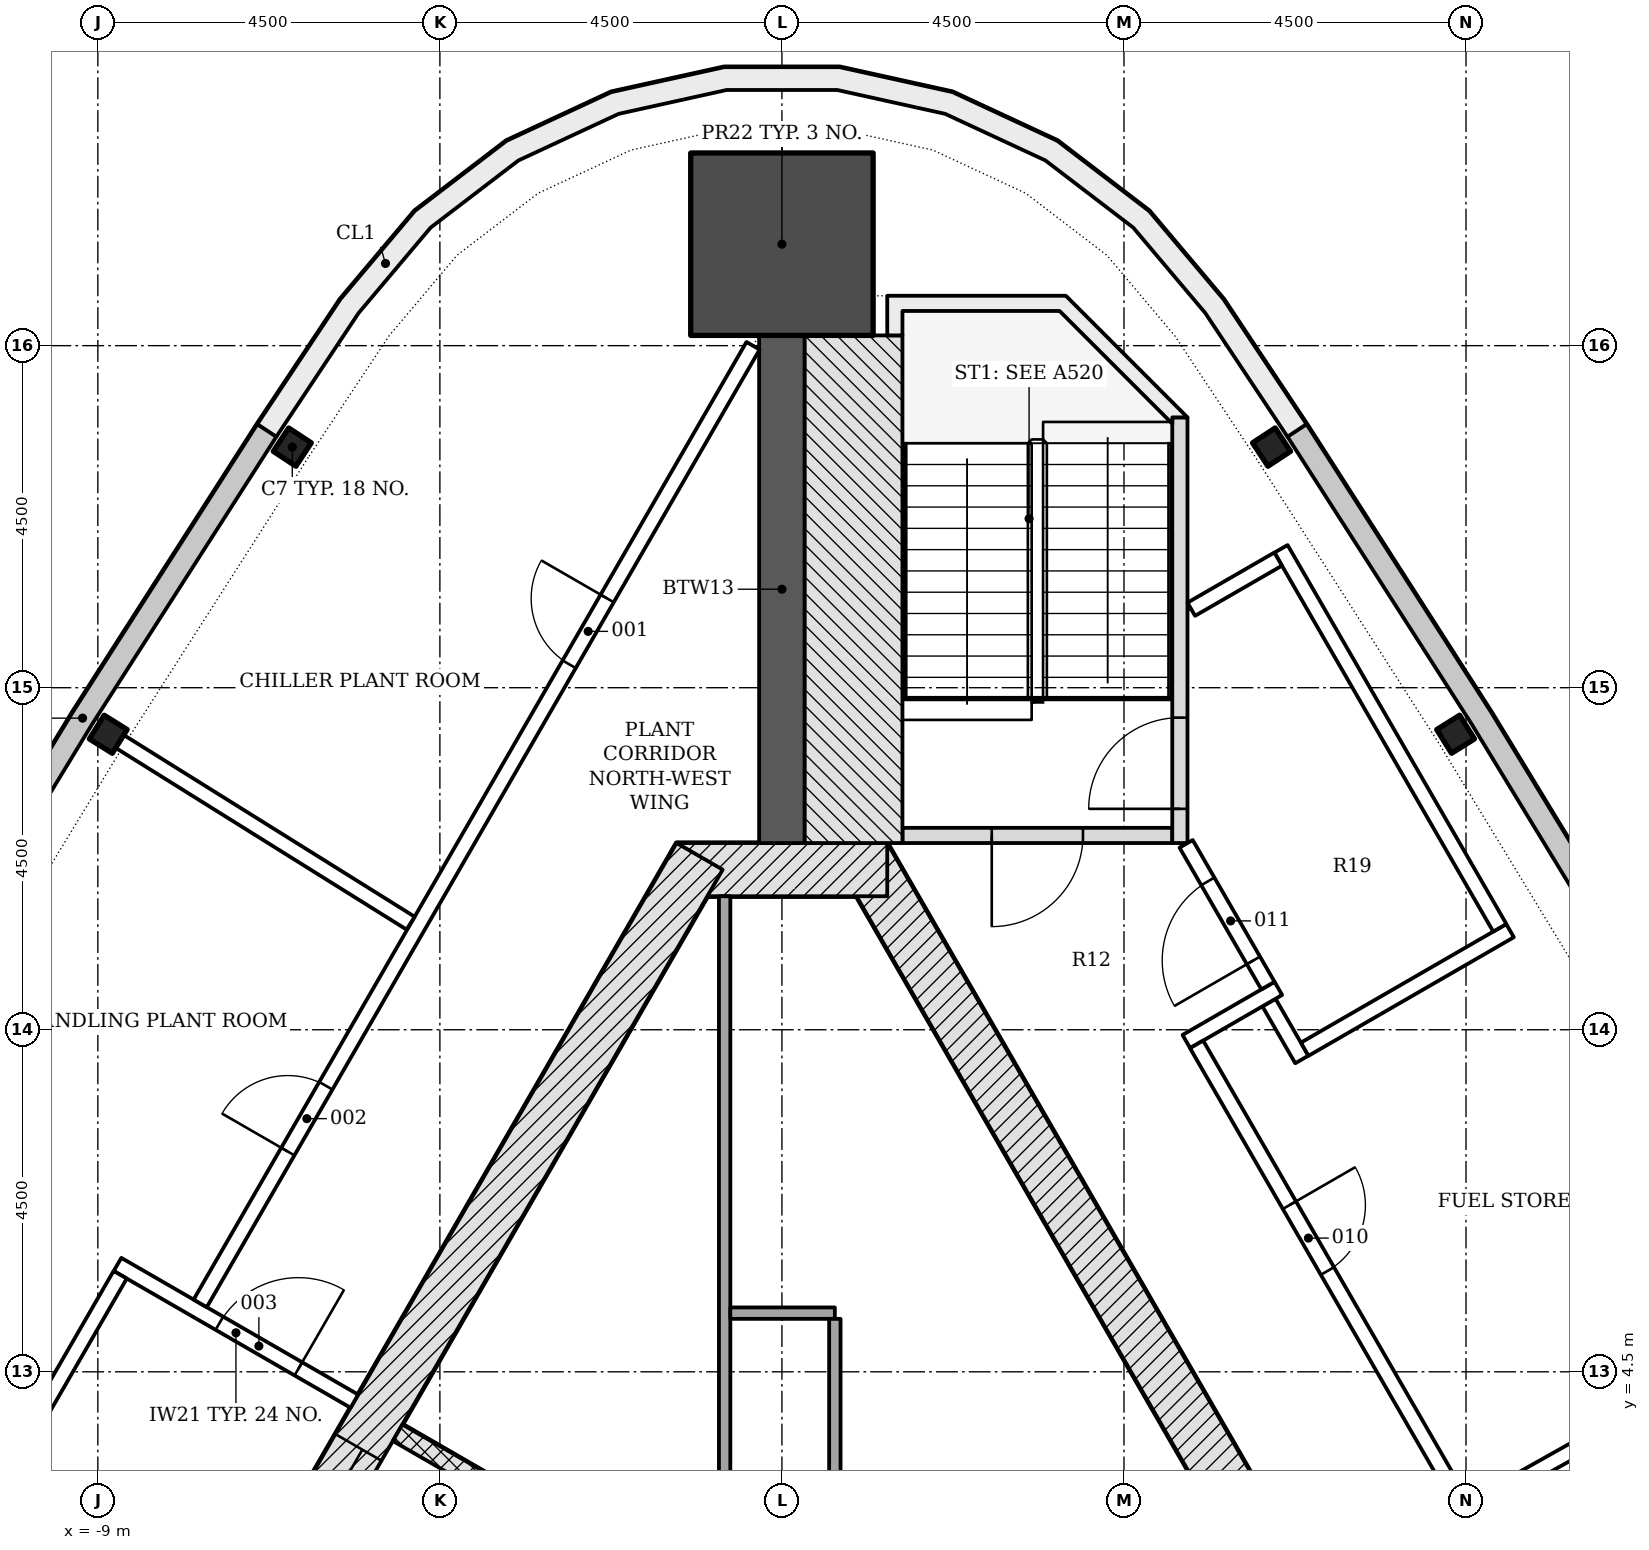
"""IFC4 building model, lengths in metres.
Left out: names, types, materials, properties, quantities, classifications, styles, units other than length and angle.
Written with IfcOpenShell. Run it as: python <this file> out.ifc"""

import sys

from ifc_helpers import new_model, si_unit, direction, frame, frame_2d, origin, origin_2d, place, context, subcontext, project, spatial, polyline, rectangle, i_section, outline, extrude, element, fill, save


model = new_model("IFC4")
c1 = context("Model", 3, precision=1e-05, world=origin(), true_north=direction((0.0, 1.0)))
c2 = subcontext(c1, "Body", "Model", "MODEL_VIEW")
j1 = project(units=[si_unit("LENGTHUNIT", "METRE"), si_unit("PLANEANGLEUNIT", "RADIAN")], contexts=[c1])
p1 = place(None, origin())
s1 = spatial("IfcSite", under=j1, at=p1, CompositionType="ELEMENT")
p2 = place(p1, origin())
s2 = spatial("IfcBuilding", under=s1, at=p2, CompositionType="ELEMENT")
p3 = place(p2, frame((0.0, 0.0, 284.1)))
s3 = spatial("IfcBuildingStorey", under=s2, at=p3, CompositionType="ELEMENT", Elevation=284.1)
p4 = place(p3, frame((10.311, -4.703, -0.25), z_axis=(0.0, 0.0, 1.0), x_axis=(-0.500001446645, 0.866024568562, 0.0)))
e1 = element("IfcWall", 1, at=p4, inside=s3, PredefinedType="SHEAR", context=c2, shape_type="SweptSolid", body=[
    extrude(rectangle(XDim=18.458, YDim=0.7, at=frame_2d((9.229, 0.0))), origin(), (0.0, 0.0, 1.0), 4.5),
])
p5 = place(p3, frame((1.386, 11.106, -0.25), z_axis=(0.0, 0.0, 1.0), x_axis=(-1.0, 0.0, 0.0)))
e2 = element("IfcWall", 2, at=p5, inside=s3, PredefinedType="SHEAR", context=c2, shape_type="SweptSolid", body=[
    extrude(rectangle(XDim=2.771, YDim=0.7, at=frame_2d((1.386, 0.0))), origin(), (0.0, 0.0, 1.0), 4.5),
])
p6 = place(p3, frame((-1.083, 11.281, -0.25), z_axis=(0.0, 0.0, 1.0), x_axis=(-0.500001446645, -0.866024568562, 0.0)))
e3 = element("IfcWall", 3, at=p6, inside=s3, PredefinedType="SHEAR", context=c2, shape_type="SweptSolid", body=[
    extrude(rectangle(XDim=18.458, YDim=0.7, at=frame_2d((9.229, 0.0))), origin(), (0.0, 0.0, 1.0), 4.5),
])
p7 = place(p6, frame((8.979, 0.0, 0.25)))
e4 = element("IfcOpeningElement", 4, at=p7, cuts=e3, PredefinedType="OPENING", context=c2, shape_type="SweptSolid", body=[
    extrude(rectangle(XDim=1.2, YDim=2.1, at=frame_2d((0.6, 1.05))), frame((0.0, 0.36, 0.0), z_axis=(0.0, -1.0, 0.0), x_axis=(1.0, 0.0, 0.0)), (0.0, 0.0, 1.0), 0.72),
])
p8 = place(p6, frame((11.029, 0.0, 0.25)))
e5 = element("IfcOpeningElement", 5, at=p8, cuts=e3, PredefinedType="OPENING", context=c2, shape_type="SweptSolid", body=[
    extrude(rectangle(XDim=1.2, YDim=2.1, at=frame_2d((0.6, 1.05))), frame((0.0, 0.36, 0.0), z_axis=(0.0, -1.0, 0.0), x_axis=(1.0, 0.0, 0.0)), (0.0, 0.0, 1.0), 0.72),
])
p9 = place(p3, frame((0.0, 11.456, -0.25), z_axis=(0.0, 0.0, 1.0), x_axis=(0.0, 1.0, 0.0)))
e6 = element("IfcWall", 6, at=p9, inside=s3, PredefinedType="SHEAR", context=c2, shape_type="SweptSolid", body=[
    extrude(rectangle(XDim=6.679, YDim=0.6, at=frame_2d((3.339, 0.0))), origin(), (0.0, 0.0, 1.0), 4.5),
])
p10 = place(p3, frame((0.0, 19.335, -0.25), z_axis=(0.0, 0.0, 1.0), x_axis=(0.0, 1.0, 0.0)))
e7 = element("IfcColumn", 7, at=p10, inside=s3, PredefinedType="COLUMN", context=c2, shape_type="SweptSolid", body=[
    extrude(rectangle(XDim=2.4, YDim=2.4, at=origin_2d()), origin(), (0.0, 0.0, 1.0), 4.5),
])
for number, where, z_axis, x_axis in (
    (8, (-6.442, 16.666, -0.25), (0.0, 0.0, 1.0), (-0.549, -0.836, 0.0)),
    (9, (-8.863, 12.888, -0.25), (0.0, 0.0, 1.0), (-0.53, -0.848, 0.0)),
    (10, (8.863, 12.888, -0.25), (0.0, 0.0, 1.0), (-0.53, 0.848, 0.0)),
    (11, (6.442, 16.666, -0.25), (0.0, 0.0, 1.0), (-0.549, 0.836, 0.0)),
):
    element("IfcColumn", number, at=place(p3, frame(where, z_axis=z_axis, x_axis=x_axis)), inside=s3, PredefinedType="COLUMN", context=c2, shape_type="SweptSolid", body=[
        extrude(i_section(OverallWidth=0.368, OverallDepth=0.356, WebThickness=0.011, FlangeThickness=0.018, FilletRadius=0.015, at=origin_2d()), origin(), (0.0, 0.0, 1.0), 4.5),
    ])
p11 = place(p3, origin())
e12 = element("IfcWall", 12, at=p11, inside=s3, PredefinedType="NOTDEFINED", context=c2, shape_type="SweptSolid", body=[
    extrude(outline(polyline([(-6.901, 16.968), (-9.33, 13.179), (-11.669, 9.335), (-11.413, 9.179), (-9.075, 13.02), (-6.649, 16.806), (-6.901, 16.968)])), origin(), (0.0, 0.0, 1.0), 4.25),
])
p12 = place(p3, origin())
e13 = element("IfcWall", 13, at=p12, inside=s3, PredefinedType="NOTDEFINED", context=c2, shape_type="SweptSolid", body=[
    extrude(outline(polyline([(11.669, 9.335), (9.33, 13.179), (6.901, 16.968), (6.649, 16.806), (9.075, 13.02), (11.413, 9.179), (11.669, 9.335)])), origin(), (0.0, 0.0, 1.0), 4.25),
])
p13 = place(p3, origin())
e14 = element("IfcWall", 14, at=p13, inside=s3, PredefinedType="NOTDEFINED", context=c2, shape_type="SweptSolid", body=[
    extrude(outline(polyline([(6.901, 16.968), (5.81, 18.61), (4.83, 19.771), (3.623, 20.695), (2.244, 21.335), (0.76, 21.664), (-0.76, 21.664), (-2.244, 21.335), (-3.623, 20.695), (-4.83, 19.771), (-5.81, 18.61), (-6.901, 16.968), (-6.651, 16.802), (-5.569, 18.429), (-4.622, 19.553), (-3.466, 20.437), (-2.147, 21.05), (-0.727, 21.364), (0.727, 21.364), (2.147, 21.05), (3.466, 20.437), (4.622, 19.553), (5.569, 18.429), (6.651, 16.802), (6.901, 16.968)])), origin(), (0.0, 0.0, 1.0), 4.25),
])
p14 = place(p3, frame((-5.056, 3.699, -0.25), z_axis=(0.0, 0.0, 1.0), x_axis=(0.866032775405, -0.499987231761, 0.0)))
e15 = element("IfcWall", 15, at=p14, inside=s3, PredefinedType="PARTITIONING", context=c2, shape_type="SweptSolid", body=[
    extrude(rectangle(XDim=2.9, YDim=0.25, at=frame_2d((1.45, 0.0))), origin(), (0.0, 0.0, 1.0), 4.5),
])
p15 = place(p3, frame((-0.754, 10.756, 0.0), z_axis=(0.0, 0.0, 1.0), x_axis=(0.0, -1.0, 0.0)))
e16 = element("IfcWall", 16, at=p15, inside=s3, PredefinedType="PARTITIONING", context=c2, shape_type="SweptSolid", body=[
    extrude(rectangle(XDim=16.985, YDim=0.15, at=frame_2d((8.492, 0.0))), origin(), (0.0, 0.0, 1.0), 4.25),
])
p16 = place(p15, frame((9.185, 0.0, 0.0)))
e17 = element("IfcOpeningElement", 17, at=p16, cuts=e16, PredefinedType="OPENING", context=c2, shape_type="SweptSolid", body=[
    extrude(rectangle(XDim=0.9, YDim=2.1, at=frame_2d((0.45, 1.05))), frame((0.0, 0.085, 0.0), z_axis=(0.0, -1.0, 0.0), x_axis=(1.0, 0.0, 0.0)), (0.0, 0.0, 1.0), 0.17),
])
p17 = place(p3, frame((-0.679, 5.272, 0.0), z_axis=(0.0, 0.0, 1.0), x_axis=(1.0, 0.0, 0.0)))
e18 = element("IfcWall", 18, at=p17, inside=s3, PredefinedType="PARTITIONING", context=c2, shape_type="SweptSolid", body=[
    extrude(rectangle(XDim=1.375, YDim=0.15, at=frame_2d((0.688, 0.0))), origin(), (0.0, 0.0, 1.0), 4.25),
])
p18 = place(p3, frame((0.696, 5.197, 0.0), z_axis=(0.0, 0.0, 1.0), x_axis=(0.0, -1.0, 0.0)))
e19 = element("IfcWall", 19, at=p18, inside=s3, PredefinedType="PARTITIONING", context=c2, shape_type="SweptSolid", body=[
    extrude(rectangle(XDim=11.425, YDim=0.15, at=frame_2d((5.712, 0.0))), origin(), (0.0, 0.0, 1.0), 4.25),
])
p19 = place(p18, frame((3.664, 0.0, 0.0)))
e20 = element("IfcOpeningElement", 20, at=p19, cuts=e19, PredefinedType="OPENING", context=c2, shape_type="SweptSolid", body=[
    extrude(rectangle(XDim=0.9, YDim=2.1, at=frame_2d((0.45, 1.05))), frame((0.0, 0.085, 0.0), z_axis=(0.0, -1.0, 0.0), x_axis=(1.0, 0.0, 0.0)), (0.0, 0.0, 1.0), 0.17),
])
p20 = place(p3, frame((5.135, 11.556, -0.25), z_axis=(0.0, 0.0, 1.0), x_axis=(-1.0, 0.0, 0.0)))
e21 = element("IfcWall", 21, at=p20, inside=s3, PredefinedType="SHEAR", context=c2, shape_type="SweptSolid", body=[
    extrude(rectangle(XDim=3.55, YDim=0.2, at=frame_2d((1.775, 0.0))), origin(), (0.0, 0.0, 1.0), 4.5),
])
p21 = place(p20, frame((1.175, 0.0, 0.25)))
e22 = element("IfcOpeningElement", 22, at=p21, cuts=e21, PredefinedType="OPENING", context=c2, shape_type="SweptSolid", body=[
    extrude(rectangle(XDim=1.2, YDim=2.1, at=frame_2d((0.6, 1.05))), frame((0.0, 0.11, 0.0), z_axis=(0.0, -1.0, 0.0), x_axis=(1.0, 0.0, 0.0)), (0.0, 0.0, 1.0), 0.22),
])
p22 = place(p3, frame((5.236, 11.456, -0.25), z_axis=(0.0, 0.0, 1.0), x_axis=(0.0, 1.0, 0.0)))
e23 = element("IfcWall", 23, at=p22, inside=s3, PredefinedType="SHEAR", context=c2, shape_type="SweptSolid", body=[
    extrude(rectangle(XDim=5.6, YDim=0.2, at=frame_2d((2.8, 0.0))), origin(), (0.0, 0.0, 1.0), 4.5),
])
p23 = place(p22, frame((0.45, 0.0, 0.25)))
e24 = element("IfcOpeningElement", 24, at=p23, cuts=e23, PredefinedType="OPENING", context=c2, shape_type="SweptSolid", body=[
    extrude(rectangle(XDim=1.2, YDim=2.1, at=frame_2d((0.6, 1.05))), frame((0.0, 0.11, 0.0), z_axis=(0.0, -1.0, 0.0), x_axis=(1.0, 0.0, 0.0)), (0.0, 0.0, 1.0), 0.22),
])
p24 = place(p3, frame((0.943, 11.456, -0.25), z_axis=(0.0, 0.0, 1.0), x_axis=(0.0, 1.0, 0.0)))
e25 = element("IfcWall", 25, at=p24, inside=s3, PredefinedType="SHEAR", context=c2, shape_type="SweptSolid", body=[
    extrude(rectangle(XDim=6.679, YDim=1.286, at=frame_2d((3.339, 0.0))), origin(), (0.0, 0.0, 1.0), 4.5),
])
p25 = place(p3, frame((0.0, 0.0, -0.25)))
e26 = element("IfcWall", 26, at=p25, inside=s3, PredefinedType="SHEAR", context=c2, shape_type="SweptSolid", body=[
    extrude(outline(polyline([(5.336, 17.056), (3.736, 18.656), (1.385, 18.656), (1.385, 18.135), (1.586, 18.135), (1.586, 18.456), (3.653, 18.456), (5.135, 16.974), (5.135, 17.056), (5.135, 17.056), (5.135, 17.056), (5.135, 17.056), (5.135, 17.056), (5.135, 17.056), (5.135, 17.056), (5.135, 17.056), (5.135, 17.056), (5.135, 17.056), (5.135, 17.056), (5.135, 17.056), (5.135, 17.056), (5.135, 17.056), (5.135, 17.056), (5.135, 17.056), (5.135, 17.056), (5.336, 17.056)])), origin(), (0.0, 0.0, 1.0), 4.5),
])
p26 = place(p3, frame((-8.741, 5.913, 0.0), z_axis=(0.0, 0.0, 1.0), x_axis=(0.866017220491, -0.500014173611, 0.0)))
e27 = element("IfcWall", 27, at=p26, inside=s3, PredefinedType="PARTITIONING", context=c2, shape_type="SweptSolid", body=[
    extrude(rectangle(XDim=3.598, YDim=0.2, at=frame_2d((1.799, 0.0))), origin(), (0.0, 0.0, 1.0), 4.25),
])
p27 = place(p26, frame((1.548, 0.0, 0.0)))
e28 = element("IfcOpeningElement", 28, at=p27, cuts=e27, PredefinedType="OPENING", context=c2, shape_type="SweptSolid", body=[
    extrude(rectangle(XDim=1.2, YDim=2.1, at=frame_2d((0.6, 1.05))), frame((0.0, 0.11, 0.0), z_axis=(0.0, -1.0, 0.0), x_axis=(1.0, 0.0, 0.0)), (0.0, 0.0, 1.0), 0.22),
])
p28 = place(p3, frame((-12.658, -1.068, 0.0), z_axis=(0.0, 0.0, 1.0), x_axis=(0.499996073327, 0.866027670838, 0.0)))
e29 = element("IfcWall", 29, at=p28, inside=s3, PredefinedType="PARTITIONING", context=c2, shape_type="SweptSolid", body=[
    extrude(rectangle(XDim=7.904, YDim=0.2, at=frame_2d((3.952, 0.0))), origin(), (0.0, 0.0, 1.0), 3.702),
])
p29 = place(p28, frame((0.541, 0.0, 0.0)))
e30 = element("IfcOpeningElement", 30, at=p29, cuts=e29, PredefinedType="OPENING", context=c2, shape_type="SweptSolid", body=[
    extrude(rectangle(XDim=1.2, YDim=2.1, at=frame_2d((0.6, 1.05))), frame((0.0, 0.11, 0.0), z_axis=(0.0, -1.0, 0.0), x_axis=(1.0, 0.0, 0.0)), (0.0, 0.0, 1.0), 0.22),
])
p30 = place(p3, frame((-7.654, 5.4, 0.0), z_axis=(0.0, 0.0, 1.0), x_axis=(0.500007192329, 0.866021251252, 0.0)))
e31 = element("IfcWall", 31, at=p30, inside=s3, PredefinedType="PARTITIONING", context=c2, shape_type="SweptSolid", body=[
    extrude(rectangle(XDim=14.547, YDim=0.2, at=frame_2d((7.273, 0.0))), origin(), (0.0, 0.0, 1.0), 3.702),
])
p31 = place(p30, frame((9.709, 0.0, 0.0)))
e32 = element("IfcOpeningElement", 32, at=p31, cuts=e31, PredefinedType="OPENING", context=c2, shape_type="SweptSolid", body=[
    extrude(rectangle(XDim=1.0, YDim=2.1, at=frame_2d((0.5, 1.05))), frame((0.0, 0.11, 0.0), z_axis=(0.0, -1.0, 0.0), x_axis=(1.0, 0.0, 0.0)), (0.0, 0.0, 1.0), 0.22),
])
p32 = place(p30, frame((2.306, 0.0, 0.0)))
e33 = element("IfcOpeningElement", 33, at=p32, cuts=e31, PredefinedType="OPENING", context=c2, shape_type="SweptSolid", body=[
    extrude(rectangle(XDim=1.0, YDim=2.1, at=frame_2d((0.5, 1.05))), frame((0.0, 0.11, 0.0), z_axis=(0.0, -1.0, 0.0), x_axis=(1.0, 0.0, 0.0)), (0.0, 0.0, 1.0), 0.22),
])
p33 = place(p3, frame((-8.736, 12.808, 0.0), z_axis=(0.0, 0.0, 1.0), x_axis=(0.848122134255, -0.529800760085, 0.0)))
e34 = element("IfcWall", 34, at=p33, inside=s3, PredefinedType="PARTITIONING", context=c2, shape_type="SweptSolid", body=[
    extrude(rectangle(XDim=4.541, YDim=0.2, at=frame_2d((2.27, 0.0))), origin(), (0.0, 0.0, 1.0), 3.702),
])
p34 = place(p3, frame((6.408, 9.358, 0.0), z_axis=(0.0, 0.0, 1.0), x_axis=(0.49996696679, -0.866044474677, 0.0)))
e35 = element("IfcWall", 35, at=p34, inside=s3, PredefinedType="PARTITIONING", context=c2, shape_type="SweptSolid", body=[
    extrude(rectangle(XDim=0.864, YDim=0.2, at=frame_2d((0.432, 0.0))), origin(), (0.0, 0.0, 1.0), 4.25),
])
p35 = place(p3, frame((5.32, 8.845, 0.0), z_axis=(0.0, 0.0, 1.0), x_axis=(0.866031452229, 0.49998952364, 0.0)))
e36 = element("IfcWall", 36, at=p35, inside=s3, PredefinedType="PARTITIONING", context=c2, shape_type="SweptSolid", body=[
    extrude(rectangle(XDim=1.398, YDim=0.2, at=frame_2d((0.699, 0.0))), origin(), (0.0, 0.0, 1.0), 4.25),
])
p36 = place(p3, frame((6.395, 9.581, 0.0), z_axis=(0.0, 0.0, 1.0), x_axis=(-0.500003735859, 0.866023246874, 0.0)))
e37 = element("IfcWall", 37, at=p36, inside=s3, PredefinedType="PARTITIONING", context=c2, shape_type="SweptSolid", body=[
    extrude(rectangle(XDim=2.154, YDim=0.2, at=frame_2d((1.077, 0.0))), origin(), (0.0, 0.0, 1.0), 3.702),
])
p37 = place(p36, frame((0.383, 0.0, 0.0)))
e38 = element("IfcOpeningElement", 38, at=p37, cuts=e37, PredefinedType="OPENING", context=c2, shape_type="SweptSolid", body=[
    extrude(rectangle(XDim=1.2, YDim=2.1, at=frame_2d((0.6, 1.05))), frame((0.0, 0.11, 0.0), z_axis=(0.0, -1.0, 0.0), x_axis=(1.0, 0.0, 0.0)), (0.0, 0.0, 1.0), 0.22),
])
p38 = place(p3, frame((5.455, 8.808, 0.0), z_axis=(0.0, 0.0, 1.0), x_axis=(0.499996641012, -0.866027343088, 0.0)))
e39 = element("IfcWall", 39, at=p38, inside=s3, PredefinedType="PARTITIONING", context=c2, shape_type="SweptSolid", body=[
    extrude(rectangle(XDim=19.937, YDim=0.2, at=frame_2d((9.969, 0.0))), origin(), (0.0, 0.0, 1.0), 3.702),
])
p39 = place(p38, frame((13.097, 0.0, 0.0)))
e40 = element("IfcOpeningElement", 40, at=p39, cuts=e39, PredefinedType="OPENING", context=c2, shape_type="SweptSolid", body=[
    extrude(rectangle(XDim=1.0, YDim=2.1, at=frame_2d((0.5, 1.05))), frame((0.0, 0.11, 0.0), z_axis=(0.0, -1.0, 0.0), x_axis=(1.0, 0.0, 0.0)), (0.0, 0.0, 1.0), 0.22),
])
p40 = place(p38, frame((2.443, 0.0, 0.0)))
e41 = element("IfcOpeningElement", 41, at=p40, cuts=e39, PredefinedType="OPENING", context=c2, shape_type="SweptSolid", body=[
    extrude(rectangle(XDim=1.0, YDim=2.1, at=frame_2d((0.5, 1.05))), frame((0.0, 0.11, 0.0), z_axis=(0.0, -1.0, 0.0), x_axis=(1.0, 0.0, 0.0)), (0.0, 0.0, 1.0), 0.22),
])
p41 = place(p3, frame((9.086, 2.722, 0.0), z_axis=(0.0, 0.0, 1.0), x_axis=(0.87175044705, 0.489950158759, 0.0)))
e42 = element("IfcWall", 42, at=p41, inside=s3, PredefinedType="PARTITIONING", context=c2, shape_type="SweptSolid", body=[
    extrude(rectangle(XDim=4.844, YDim=0.2, at=frame_2d((2.422, 0.0))), origin(), (0.0, 0.0, 1.0), 3.702),
])
p42 = place(p3, frame((6.878, 8.744, 0.0), z_axis=(0.0, 0.0, 1.0), x_axis=(0.866023983177, 0.500002460556, 0.0)))
e43 = element("IfcWall", 43, at=p42, inside=s3, PredefinedType="PARTITIONING", context=c2, shape_type="SweptSolid", body=[
    extrude(rectangle(XDim=3.12, YDim=0.2, at=frame_2d((1.56, 0.0))), origin(), (0.0, 0.0, 1.0), 4.25),
])
p43 = place(p3, frame((6.566, 15.327, 0.0), z_axis=(0.0, 0.0, 1.0), x_axis=(0.499997778408, -0.866026686418, 0.0)))
e44 = element("IfcWall", 44, at=p43, inside=s3, PredefinedType="PARTITIONING", context=c2, shape_type="SweptSolid", body=[
    extrude(rectangle(XDim=5.757, YDim=0.2, at=frame_2d((2.878, 0.0))), origin(), (0.0, 0.0, 1.0), 3.702),
])
p44 = place(p3, frame((6.529, 15.192, 0.0), z_axis=(0.0, 0.0, 1.0), x_axis=(-0.866117824122, -0.499839889103, 0.0)))
e45 = element("IfcWall", 45, at=p44, inside=s3, PredefinedType="PARTITIONING", context=c2, shape_type="SweptSolid", body=[
    extrude(rectangle(XDim=1.32, YDim=0.2, at=frame_2d((0.66, 0.0))), origin(), (0.0, 0.0, 1.0), 4.25),
])
p45 = place(p7, origin())
e46 = element("IfcDoor", 46, at=p45, inside=s3, OperationType="DOUBLE_DOOR_SLIDING", PredefinedType="DOOR", context=c2, shape_type="SweptSolid", body=[
    extrude(rectangle(XDim=1.2, YDim=2.1, at=frame_2d((0.6, 1.05))), frame((0.0, 0.025, 0.0), z_axis=(0.0, -1.0, 0.0), x_axis=(1.0, 0.0, 0.0)), (0.0, 0.0, 1.0), 0.05),
])
fill(e4, e46)
p46 = place(p21, origin())
e47 = element("IfcDoor", 47, at=p46, inside=s3, OperationType="SINGLE_SWING_RIGHT", PredefinedType="DOOR", context=c2, shape_type="SweptSolid", body=[
    extrude(rectangle(XDim=1.2, YDim=2.1, at=frame_2d((0.6, 1.05))), frame((0.0, 0.025, 0.0), z_axis=(0.0, -1.0, 0.0), x_axis=(1.0, 0.0, 0.0)), (0.0, 0.0, 1.0), 0.05),
])
fill(e22, e47)
p47 = place(p23, origin())
e48 = element("IfcDoor", 48, at=p47, inside=s3, OperationType="SINGLE_SWING_LEFT", PredefinedType="DOOR", context=c2, shape_type="SweptSolid", body=[
    extrude(rectangle(XDim=1.2, YDim=2.1, at=frame_2d((0.6, 1.05))), frame((0.0, 0.025, 0.0), z_axis=(0.0, -1.0, 0.0), x_axis=(1.0, 0.0, 0.0)), (0.0, 0.0, 1.0), 0.05),
])
fill(e24, e48)
p48 = place(p31, origin())
e49 = element("IfcDoor", 49, at=p48, inside=s3, OperationType="SINGLE_SWING_RIGHT", PredefinedType="DOOR", context=c2, shape_type="SweptSolid", body=[
    extrude(rectangle(XDim=1.0, YDim=2.1, at=frame_2d((0.5, 1.05))), frame((0.0, 0.025, 0.0), z_axis=(0.0, -1.0, 0.0), x_axis=(1.0, 0.0, 0.0)), (0.0, 0.0, 1.0), 0.05),
])
fill(e32, e49)
p49 = place(p32, origin())
e50 = element("IfcDoor", 50, at=p49, inside=s3, OperationType="SINGLE_SWING_LEFT", PredefinedType="DOOR", context=c2, shape_type="SweptSolid", body=[
    extrude(rectangle(XDim=1.0, YDim=2.1, at=frame_2d((0.5, 1.05))), frame((0.0, 0.025, 0.0), z_axis=(0.0, -1.0, 0.0), x_axis=(1.0, 0.0, 0.0)), (0.0, 0.0, 1.0), 0.05),
])
fill(e33, e50)
p50 = place(p27, origin())
e51 = element("IfcDoor", 51, at=p50, inside=s3, OperationType="SINGLE_SWING_RIGHT", PredefinedType="DOOR", context=c2, shape_type="SweptSolid", body=[
    extrude(rectangle(XDim=1.2, YDim=2.1, at=frame_2d((0.6, 1.05))), frame((0.0, 0.025, 0.0), z_axis=(0.0, -1.0, 0.0), x_axis=(1.0, 0.0, 0.0)), (0.0, 0.0, 1.0), 0.05),
])
fill(e28, e51)
p51 = place(p40, origin())
e52 = element("IfcDoor", 52, at=p51, inside=s3, OperationType="SINGLE_SWING_LEFT", PredefinedType="DOOR", context=c2, shape_type="SweptSolid", body=[
    extrude(rectangle(XDim=1.0, YDim=2.1, at=frame_2d((0.5, 1.05))), frame((0.0, 0.025, 0.0), z_axis=(0.0, -1.0, 0.0), x_axis=(1.0, 0.0, 0.0)), (0.0, 0.0, 1.0), 0.05),
])
fill(e41, e52)
p52 = place(p37, origin())
e53 = element("IfcDoor", 53, at=p52, inside=s3, OperationType="SINGLE_SWING_LEFT", PredefinedType="DOOR", context=c2, shape_type="SweptSolid", body=[
    extrude(rectangle(XDim=1.2, YDim=2.1, at=frame_2d((0.6, 1.05))), frame((0.0, 0.025, 0.0), z_axis=(0.0, -1.0, 0.0), x_axis=(1.0, 0.0, 0.0)), (0.0, 0.0, 1.0), 0.05),
])
fill(e38, e53)
save(model, sys.argv[1])
